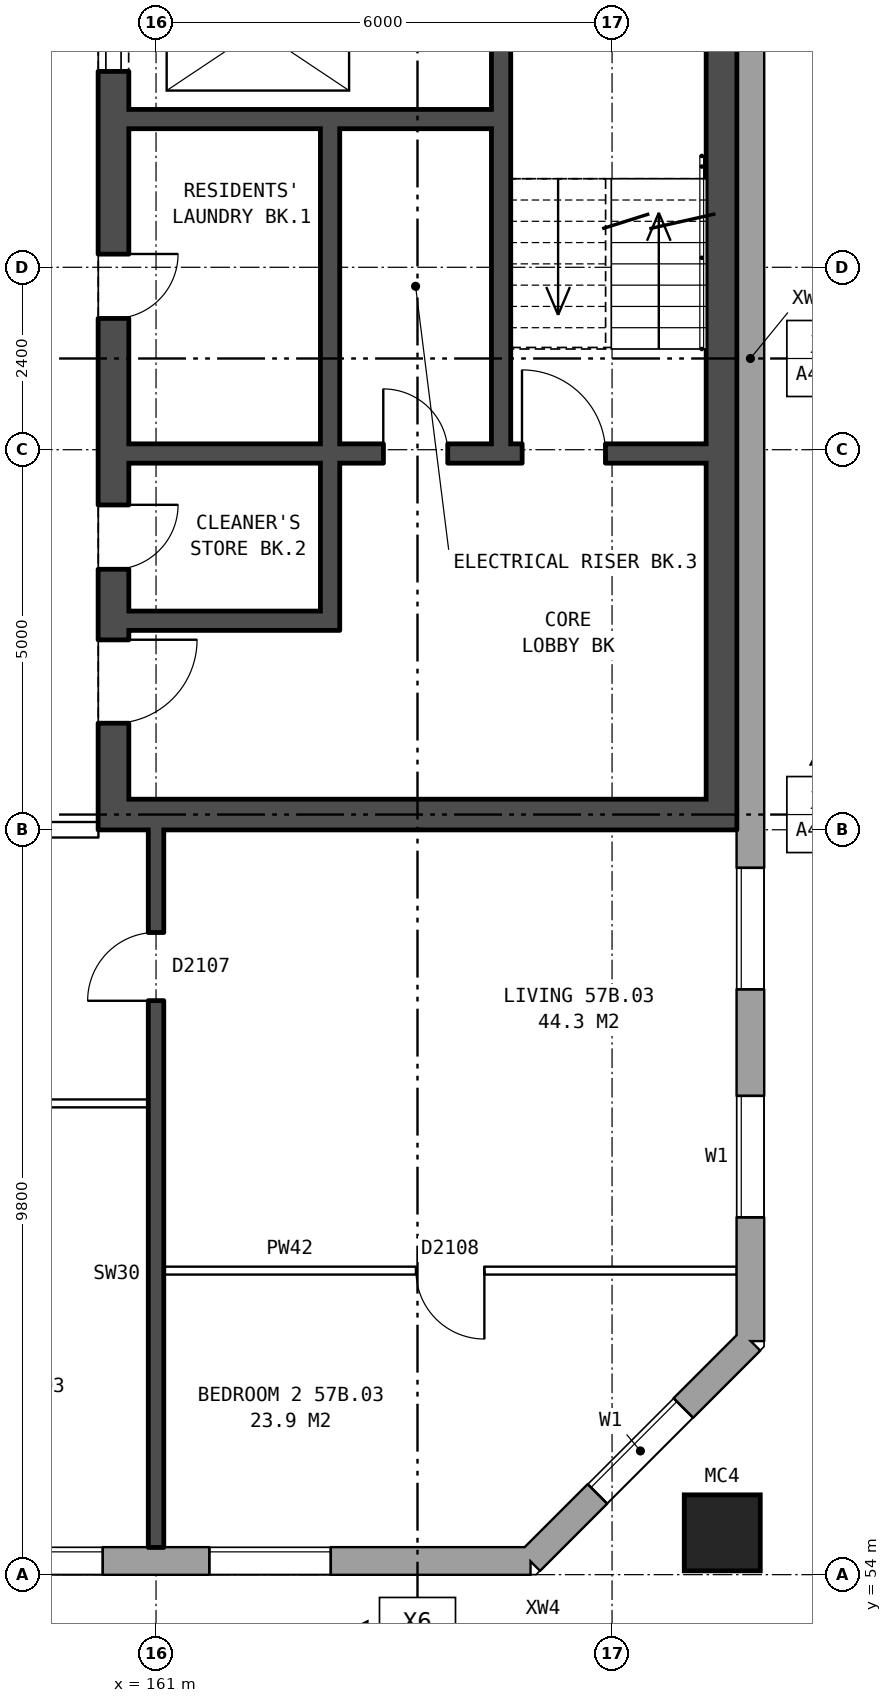
"""IFC4 building model, lengths in metres.
Left out: names, types, materials, properties, quantities, classifications, styles, units other than length and angle.
Written with IfcOpenShell. Run it as: python <this file> out.ifc"""

import sys

from ifc_helpers import new_model, si_unit, direction, frame, frame_2d, origin, origin_2d, place, context, subcontext, project, spatial, rectangle, hollow_rectangle, extrude, element, fill, save


model = new_model("IFC4")
c1 = context("Model", 3, precision=1e-05, world=origin(), true_north=direction((0.0, 1.0)))
c2 = subcontext(c1, "Body", "Model", "MODEL_VIEW")
j1 = project(units=[si_unit("LENGTHUNIT", "METRE"), si_unit("PLANEANGLEUNIT", "RADIAN")], contexts=[c1])
p1 = place(None, origin())
s1 = spatial("IfcSite", under=j1, at=p1, CompositionType="ELEMENT")
p2 = place(p1, origin())
s2 = spatial("IfcBuilding", under=s1, at=p2, CompositionType="ELEMENT")
p3 = place(p2, frame((0.0, 0.0, 202.8)))
s3 = spatial("IfcBuildingStorey", under=s2, at=p3, CompositionType="ELEMENT", Elevation=202.8)
p4 = place(p3, frame((168.45, 54.55, 0.0), z_axis=(0.0, 0.0, 1.0), x_axis=(1.0, 0.0, 0.0)))
e1 = element("IfcColumn", 1, at=p4, inside=s3, PredefinedType="COLUMN", context=c2, shape_type="SweptSolid", body=[
    extrude(hollow_rectangle(XDim=1.0, YDim=1.0, WallThickness=0.055, at=origin_2d()), origin(), (0.0, 0.0, 1.0), 3.1),
])
p5 = place(p3, frame((132.05, 54.18, 0.0), z_axis=(0.0, 0.0, 1.0), x_axis=(1.0, 0.0, 0.0)))
e2 = element("IfcWall", 2, at=p5, inside=s3, PredefinedType="STANDARD", context=c2, shape_type="SweptSolid", body=[
    extrude(rectangle(XDim=33.875, YDim=0.36, at=frame_2d((16.938, 0.0))), origin(), (0.0, 0.0, 1.0), 2.85),
])
p6 = place(p5, frame((2.65, 0.0, 0.8)))
e3 = element("IfcOpeningElement", 3, at=p6, cuts=e2, PredefinedType="OPENING", context=c2, shape_type="SweptSolid", body=[
    extrude(rectangle(XDim=1.6, YDim=1.8, at=frame_2d((0.8, 0.9))), frame((0.0, 0.19, 0.0), z_axis=(0.0, -1.0, 0.0), x_axis=(1.0, 0.0, 0.0)), (0.0, 0.0, 1.0), 0.38),
])
p7 = place(p5, frame((5.65, 0.0, 0.8)))
e4 = element("IfcOpeningElement", 4, at=p7, cuts=e2, PredefinedType="OPENING", context=c2, shape_type="SweptSolid", body=[
    extrude(rectangle(XDim=1.6, YDim=1.8, at=frame_2d((0.8, 0.9))), frame((0.0, 0.19, 0.0), z_axis=(0.0, -1.0, 0.0), x_axis=(1.0, 0.0, 0.0)), (0.0, 0.0, 1.0), 0.38),
])
p8 = place(p5, frame((8.65, 0.0, 0.8)))
e5 = element("IfcOpeningElement", 5, at=p8, cuts=e2, PredefinedType="OPENING", context=c2, shape_type="SweptSolid", body=[
    extrude(rectangle(XDim=1.6, YDim=1.8, at=frame_2d((0.8, 0.9))), frame((0.0, 0.19, 0.0), z_axis=(0.0, -1.0, 0.0), x_axis=(1.0, 0.0, 0.0)), (0.0, 0.0, 1.0), 0.38),
])
p9 = place(p5, frame((11.65, 0.0, 0.8)))
e6 = element("IfcOpeningElement", 6, at=p9, cuts=e2, PredefinedType="OPENING", context=c2, shape_type="SweptSolid", body=[
    extrude(rectangle(XDim=1.6, YDim=1.8, at=frame_2d((0.8, 0.9))), frame((0.0, 0.19, 0.0), z_axis=(0.0, -1.0, 0.0), x_axis=(1.0, 0.0, 0.0)), (0.0, 0.0, 1.0), 0.38),
])
p10 = place(p5, frame((14.65, 0.0, 0.8)))
e7 = element("IfcOpeningElement", 7, at=p10, cuts=e2, PredefinedType="OPENING", context=c2, shape_type="SweptSolid", body=[
    extrude(rectangle(XDim=1.6, YDim=1.8, at=frame_2d((0.8, 0.9))), frame((0.0, 0.19, 0.0), z_axis=(0.0, -1.0, 0.0), x_axis=(1.0, 0.0, 0.0)), (0.0, 0.0, 1.0), 0.38),
])
p11 = place(p5, frame((17.65, 0.0, 0.8)))
e8 = element("IfcOpeningElement", 8, at=p11, cuts=e2, PredefinedType="OPENING", context=c2, shape_type="SweptSolid", body=[
    extrude(rectangle(XDim=1.6, YDim=1.8, at=frame_2d((0.8, 0.9))), frame((0.0, 0.19, 0.0), z_axis=(0.0, -1.0, 0.0), x_axis=(1.0, 0.0, 0.0)), (0.0, 0.0, 1.0), 0.38),
])
p12 = place(p5, frame((20.65, 0.0, 0.8)))
e9 = element("IfcOpeningElement", 9, at=p12, cuts=e2, PredefinedType="OPENING", context=c2, shape_type="SweptSolid", body=[
    extrude(rectangle(XDim=1.6, YDim=1.8, at=frame_2d((0.8, 0.9))), frame((0.0, 0.19, 0.0), z_axis=(0.0, -1.0, 0.0), x_axis=(1.0, 0.0, 0.0)), (0.0, 0.0, 1.0), 0.38),
])
p13 = place(p5, frame((23.65, 0.0, 0.8)))
e10 = element("IfcOpeningElement", 10, at=p13, cuts=e2, PredefinedType="OPENING", context=c2, shape_type="SweptSolid", body=[
    extrude(rectangle(XDim=1.6, YDim=1.8, at=frame_2d((0.8, 0.9))), frame((0.0, 0.19, 0.0), z_axis=(0.0, -1.0, 0.0), x_axis=(1.0, 0.0, 0.0)), (0.0, 0.0, 1.0), 0.38),
])
p14 = place(p5, frame((26.65, 0.0, 0.8)))
e11 = element("IfcOpeningElement", 11, at=p14, cuts=e2, PredefinedType="OPENING", context=c2, shape_type="SweptSolid", body=[
    extrude(rectangle(XDim=1.6, YDim=1.8, at=frame_2d((0.8, 0.9))), frame((0.0, 0.19, 0.0), z_axis=(0.0, -1.0, 0.0), x_axis=(1.0, 0.0, 0.0)), (0.0, 0.0, 1.0), 0.38),
])
p15 = place(p5, frame((29.65, 0.0, 0.8)))
e12 = element("IfcOpeningElement", 12, at=p15, cuts=e2, PredefinedType="OPENING", context=c2, shape_type="SweptSolid", body=[
    extrude(rectangle(XDim=1.6, YDim=1.8, at=frame_2d((0.8, 0.9))), frame((0.0, 0.19, 0.0), z_axis=(0.0, -1.0, 0.0), x_axis=(1.0, 0.0, 0.0)), (0.0, 0.0, 1.0), 0.38),
])
p16 = place(p3, frame((165.925, 54.18, 0.0), z_axis=(0.0, 0.0, 1.0), x_axis=(0.707106781187, 0.707106781187, 0.0)))
e13 = element("IfcWall", 13, at=p16, inside=s3, PredefinedType="STANDARD", context=c2, shape_type="SweptSolid", body=[
    extrude(rectangle(XDim=4.094, YDim=0.36, at=frame_2d((2.047, 0.0))), origin(), (0.0, 0.0, 1.0), 2.85),
])
p17 = place(p16, frame((1.247, 0.0, 0.8)))
e14 = element("IfcOpeningElement", 14, at=p17, cuts=e13, PredefinedType="OPENING", context=c2, shape_type="SweptSolid", body=[
    extrude(rectangle(XDim=1.6, YDim=1.8, at=frame_2d((0.8, 0.9))), frame((0.0, 0.19, 0.0), z_axis=(0.0, -1.0, 0.0), x_axis=(1.0, 0.0, 0.0)), (0.0, 0.0, 1.0), 0.38),
])
p18 = place(p3, frame((168.82, 57.075, 0.0), z_axis=(0.0, 0.0, 1.0), x_axis=(0.0, 1.0, 0.0)))
e15 = element("IfcWall", 15, at=p18, inside=s3, PredefinedType="STANDARD", context=c2, shape_type="SweptSolid", body=[
    extrude(rectangle(XDim=25.851, YDim=0.36, at=frame_2d((12.925, 0.0))), origin(), (0.0, 0.0, 1.0), 2.85),
])
p19 = place(p18, frame((1.625, 0.0, 0.8)))
e16 = element("IfcOpeningElement", 16, at=p19, cuts=e15, PredefinedType="OPENING", context=c2, shape_type="SweptSolid", body=[
    extrude(rectangle(XDim=1.6, YDim=1.8, at=frame_2d((0.8, 0.9))), frame((0.0, 0.19, 0.0), z_axis=(0.0, -1.0, 0.0), x_axis=(1.0, 0.0, 0.0)), (0.0, 0.0, 1.0), 0.38),
])
p20 = place(p18, frame((4.625, 0.0, 0.8)))
e17 = element("IfcOpeningElement", 17, at=p20, cuts=e15, PredefinedType="OPENING", context=c2, shape_type="SweptSolid", body=[
    extrude(rectangle(XDim=1.6, YDim=1.8, at=frame_2d((0.8, 0.9))), frame((0.0, 0.19, 0.0), z_axis=(0.0, -1.0, 0.0), x_axis=(1.0, 0.0, 0.0)), (0.0, 0.0, 1.0), 0.38),
])
p21 = place(p18, frame((19.625, 0.0, 0.8)))
e18 = element("IfcOpeningElement", 18, at=p21, cuts=e15, PredefinedType="OPENING", context=c2, shape_type="SweptSolid", body=[
    extrude(rectangle(XDim=1.6, YDim=1.8, at=frame_2d((0.8, 0.9))), frame((0.0, 0.19, 0.0), z_axis=(0.0, -1.0, 0.0), x_axis=(1.0, 0.0, 0.0)), (0.0, 0.0, 1.0), 0.38),
])
p22 = place(p18, frame((22.625, 0.0, 0.8)))
e19 = element("IfcOpeningElement", 19, at=p22, cuts=e15, PredefinedType="OPENING", context=c2, shape_type="SweptSolid", body=[
    extrude(rectangle(XDim=1.6, YDim=1.8, at=frame_2d((0.8, 0.9))), frame((0.0, 0.19, 0.0), z_axis=(0.0, -1.0, 0.0), x_axis=(1.0, 0.0, 0.0)), (0.0, 0.0, 1.0), 0.38),
])
p23 = place(p3, frame((160.44, 76.2, 0.0), z_axis=(0.0, 0.0, 1.0), x_axis=(0.0, -1.0, 0.0)))
e20 = element("IfcWall", 20, at=p23, inside=s3, PredefinedType="SHEAR", context=c2, shape_type="SweptSolid", body=[
    extrude(rectangle(XDim=12.4, YDim=0.4, at=frame_2d((6.2, 0.0))), origin(), (0.0, 0.0, 1.0), 2.85),
])
p24 = place(p23, frame((1.325, 0.0, 0.0)))
e21 = element("IfcOpeningElement", 21, at=p24, cuts=e20, PredefinedType="OPENING", context=c2, shape_type="SweptSolid", body=[
    extrude(rectangle(XDim=1.1, YDim=2.1, at=frame_2d((0.55, 1.05))), frame((0.0, 0.21, 0.0), z_axis=(0.0, -1.0, 0.0), x_axis=(1.0, 0.0, 0.0)), (0.0, 0.0, 1.0), 0.42),
])
p25 = place(p23, frame((4.825, 0.0, 0.0)))
e22 = element("IfcOpeningElement", 22, at=p25, cuts=e20, PredefinedType="OPENING", context=c2, shape_type="SweptSolid", body=[
    extrude(rectangle(XDim=0.85, YDim=2.1, at=frame_2d((0.425, 1.05))), frame((0.0, 0.21, 0.0), z_axis=(0.0, -1.0, 0.0), x_axis=(1.0, 0.0, 0.0)), (0.0, 0.0, 1.0), 0.42),
])
p26 = place(p23, frame((9.9, 0.0, 0.0)))
e23 = element("IfcOpeningElement", 23, at=p26, cuts=e20, PredefinedType="OPENING", context=c2, shape_type="SweptSolid", body=[
    extrude(rectangle(XDim=1.1, YDim=2.1, at=frame_2d((0.55, 1.05))), frame((0.0, 0.21, 0.0), z_axis=(0.0, -1.0, 0.0), x_axis=(1.0, 0.0, 0.0)), (0.0, 0.0, 1.0), 0.42),
])
p27 = place(p23, frame((8.125, 0.0, 0.0)))
e24 = element("IfcOpeningElement", 24, at=p27, cuts=e20, PredefinedType="OPENING", context=c2, shape_type="SweptSolid", body=[
    extrude(rectangle(XDim=0.85, YDim=2.1, at=frame_2d((0.425, 1.05))), frame((0.0, 0.21, 0.0), z_axis=(0.0, -1.0, 0.0), x_axis=(1.0, 0.0, 0.0)), (0.0, 0.0, 1.0), 0.42),
])
p28 = place(p3, frame((168.44, 76.2, 0.0), z_axis=(0.0, 0.0, 1.0), x_axis=(0.0, -1.0, 0.0)))
e25 = element("IfcWall", 25, at=p28, inside=s3, PredefinedType="SHEAR", context=c2, shape_type="SweptSolid", body=[
    extrude(rectangle(XDim=12.4, YDim=0.4, at=frame_2d((6.2, 0.0))), origin(), (0.0, 0.0, 1.0), 2.85),
])
p29 = place(p3, frame((160.64, 64.0, 0.0), z_axis=(0.0, 0.0, 1.0), x_axis=(1.0, 0.0, 0.0)))
e26 = element("IfcWall", 26, at=p29, inside=s3, PredefinedType="SHEAR", context=c2, shape_type="SweptSolid", body=[
    extrude(rectangle(XDim=7.6, YDim=0.4, at=frame_2d((3.8, 0.0))), origin(), (0.0, 0.0, 1.0), 2.85),
])
p30 = place(p3, frame((160.64, 73.15, 0.0), z_axis=(0.0, 0.0, 1.0), x_axis=(1.0, 0.0, 0.0)))
e27 = element("IfcWall", 27, at=p30, inside=s3, PredefinedType="SHEAR", context=c2, shape_type="SweptSolid", body=[
    extrude(rectangle(XDim=4.775, YDim=0.25, at=frame_2d((2.388, 0.0))), origin(), (0.0, 0.0, 1.0), 2.85),
])
p31 = place(p3, frame((160.64, 68.75, 0.0), z_axis=(0.0, 0.0, 1.0), x_axis=(1.0, 0.0, 0.0)))
e28 = element("IfcWall", 28, at=p31, inside=s3, PredefinedType="SHEAR", context=c2, shape_type="SweptSolid", body=[
    extrude(rectangle(XDim=7.6, YDim=0.25, at=frame_2d((3.8, 0.0))), origin(), (0.0, 0.0, 1.0), 2.85),
])
p32 = place(p31, frame((5.175, 0.0, 0.0)))
e29 = element("IfcOpeningElement", 29, at=p32, cuts=e28, PredefinedType="OPENING", context=c2, shape_type="SweptSolid", body=[
    extrude(rectangle(XDim=1.1, YDim=2.1, at=frame_2d((0.55, 1.05))), frame((0.0, 0.135, 0.0), z_axis=(0.0, -1.0, 0.0), x_axis=(1.0, 0.0, 0.0)), (0.0, 0.0, 1.0), 0.27),
])
p33 = place(p31, frame((3.35, 0.0, 0.0)))
e30 = element("IfcOpeningElement", 30, at=p33, cuts=e28, PredefinedType="OPENING", context=c2, shape_type="SweptSolid", body=[
    extrude(rectangle(XDim=0.85, YDim=2.1, at=frame_2d((0.425, 1.05))), frame((0.0, 0.135, 0.0), z_axis=(0.0, -1.0, 0.0), x_axis=(1.0, 0.0, 0.0)), (0.0, 0.0, 1.0), 0.27),
])
p34 = place(p3, frame((160.64, 66.55, 0.0), z_axis=(0.0, 0.0, 1.0), x_axis=(1.0, 0.0, 0.0)))
e31 = element("IfcWall", 31, at=p34, inside=s3, PredefinedType="SHEAR", context=c2, shape_type="SweptSolid", body=[
    extrude(rectangle(XDim=2.525, YDim=0.25, at=frame_2d((1.263, 0.0))), origin(), (0.0, 0.0, 1.0), 2.85),
])
p35 = place(p3, frame((163.29, 73.025, 0.0), z_axis=(0.0, 0.0, 1.0), x_axis=(0.0, -1.0, 0.0)))
e32 = element("IfcWall", 32, at=p35, inside=s3, PredefinedType="SHEAR", context=c2, shape_type="SweptSolid", body=[
    extrude(rectangle(XDim=4.15, YDim=0.25, at=frame_2d((2.075, 0.0))), origin(), (0.0, 0.0, 1.0), 2.85),
])
p36 = place(p3, frame((163.29, 68.625, 0.0), z_axis=(0.0, 0.0, 1.0), x_axis=(0.0, -1.0, 0.0)))
e33 = element("IfcWall", 33, at=p36, inside=s3, PredefinedType="SHEAR", context=c2, shape_type="SweptSolid", body=[
    extrude(rectangle(XDim=2.2, YDim=0.25, at=frame_2d((1.1, 0.0))), origin(), (0.0, 0.0, 1.0), 2.85),
])
p37 = place(p3, frame((165.54, 75.8, 0.0), z_axis=(0.0, 0.0, 1.0), x_axis=(0.0, -1.0, 0.0)))
e34 = element("IfcWall", 34, at=p37, inside=s3, PredefinedType="SHEAR", context=c2, shape_type="SweptSolid", body=[
    extrude(rectangle(XDim=6.925, YDim=0.25, at=frame_2d((3.462, 0.0))), origin(), (0.0, 0.0, 1.0), 2.85),
])
p38 = place(p3, frame((161.1, 58.0, 0.0), z_axis=(0.0, 0.0, 1.0), x_axis=(1.0, 0.0, 0.0)))
e35 = element("IfcWall", 35, at=p38, inside=s3, PredefinedType="PARTITIONING", context=c2, shape_type="SweptSolid", body=[
    extrude(rectangle(XDim=7.54, YDim=0.1, at=frame_2d((3.77, 0.0))), origin(), (0.0, 0.0, 1.0), 2.85),
])
p39 = place(p38, frame((3.32, 0.0, 0.0)))
e36 = element("IfcOpeningElement", 36, at=p39, cuts=e35, PredefinedType="OPENING", context=c2, shape_type="SweptSolid", body=[
    extrude(rectangle(XDim=0.9, YDim=2.1, at=frame_2d((0.45, 1.05))), frame((0.0, 0.06, 0.0), z_axis=(0.0, -1.0, 0.0), x_axis=(1.0, 0.0, 0.0)), (0.0, 0.0, 1.0), 0.12),
])
p40 = place(p3, frame((155.1, 60.2, 0.0), z_axis=(0.0, 0.0, 1.0), x_axis=(1.0, 0.0, 0.0)))
e37 = element("IfcWall", 37, at=p40, inside=s3, PredefinedType="PARTITIONING", context=c2, shape_type="SweptSolid", body=[
    extrude(rectangle(XDim=5.8, YDim=0.1, at=frame_2d((2.9, 0.0))), origin(), (0.0, 0.0, 1.0), 2.85),
])
p41 = place(p40, frame((3.6, 0.0, 0.0)))
e38 = element("IfcOpeningElement", 38, at=p41, cuts=e37, PredefinedType="OPENING", context=c2, shape_type="SweptSolid", body=[
    extrude(rectangle(XDim=0.9, YDim=2.1, at=frame_2d((0.45, 1.05))), frame((0.0, 0.06, 0.0), z_axis=(0.0, -1.0, 0.0), x_axis=(1.0, 0.0, 0.0)), (0.0, 0.0, 1.0), 0.12),
])
p42 = place(p40, frame((0.7, 0.0, 0.0)))
e39 = element("IfcOpeningElement", 39, at=p42, cuts=e37, PredefinedType="OPENING", context=c2, shape_type="SweptSolid", body=[
    extrude(rectangle(XDim=0.9, YDim=2.1, at=frame_2d((0.45, 1.05))), frame((0.0, 0.06, 0.0), z_axis=(0.0, -1.0, 0.0), x_axis=(1.0, 0.0, 0.0)), (0.0, 0.0, 1.0), 0.12),
])
p43 = place(p3, frame((157.24, 63.8, 0.0), z_axis=(0.0, 0.0, 1.0), x_axis=(1.0, 0.0, 0.0)))
e40 = element("IfcWall", 40, at=p43, inside=s3, PredefinedType="PARTITIONING", context=c2, shape_type="SweptSolid", body=[
    extrude(rectangle(XDim=3.0, YDim=0.2, at=frame_2d((1.5, 0.0))), origin(), (0.0, 0.0, 1.0), 2.85),
])
p44 = place(p43, frame((1.0, 0.0, 0.0)))
e41 = element("IfcOpeningElement", 41, at=p44, cuts=e40, PredefinedType="OPENING", context=c2, shape_type="SweptSolid", body=[
    extrude(rectangle(XDim=1.0, YDim=2.1, at=frame_2d((0.5, 1.05))), frame((0.0, 0.11, 0.0), z_axis=(0.0, -1.0, 0.0), x_axis=(1.0, 0.0, 0.0)), (0.0, 0.0, 1.0), 0.22),
])
p45 = place(p3, frame((161.0, 54.36, 0.0), z_axis=(0.0, 0.0, 1.0), x_axis=(0.0, 1.0, 0.0)))
e42 = element("IfcWall", 42, at=p45, inside=s3, PredefinedType="SOLIDWALL", context=c2, shape_type="SweptSolid", body=[
    extrude(rectangle(XDim=9.44, YDim=0.2, at=frame_2d((4.72, 0.0))), origin(), (0.0, 0.0, 1.0), 2.85),
])
p46 = place(p45, frame((7.19, 0.0, 0.0)))
e43 = element("IfcOpeningElement", 43, at=p46, cuts=e42, PredefinedType="OPENING", context=c2, shape_type="SweptSolid", body=[
    extrude(rectangle(XDim=0.9, YDim=2.1, at=frame_2d((0.45, 1.05))), frame((0.0, 0.11, 0.0), z_axis=(0.0, -1.0, 0.0), x_axis=(1.0, 0.0, 0.0)), (0.0, 0.0, 1.0), 0.22),
])
p47 = place(p14, origin())
e44 = element("IfcWindow", 44, at=p47, inside=s3, PartitioningType="SINGLE_PANEL", PredefinedType="WINDOW", context=c2, shape_type="SweptSolid", body=[
    extrude(rectangle(XDim=1.6, YDim=1.8, at=frame_2d((0.8, 0.9))), frame((0.0, 0.15, 0.0), z_axis=(0.0, -1.0, 0.0), x_axis=(1.0, 0.0, 0.0)), (0.0, 0.0, 1.0), 0.06),
])
fill(e11, e44)
p48 = place(p15, origin())
e45 = element("IfcWindow", 45, at=p48, inside=s3, PartitioningType="SINGLE_PANEL", PredefinedType="WINDOW", context=c2, shape_type="SweptSolid", body=[
    extrude(rectangle(XDim=1.6, YDim=1.8, at=frame_2d((0.8, 0.9))), frame((0.0, 0.15, 0.0), z_axis=(0.0, -1.0, 0.0), x_axis=(1.0, 0.0, 0.0)), (0.0, 0.0, 1.0), 0.06),
])
fill(e12, e45)
p49 = place(p17, origin())
e46 = element("IfcWindow", 46, at=p49, inside=s3, PartitioningType="SINGLE_PANEL", PredefinedType="WINDOW", context=c2, shape_type="SweptSolid", body=[
    extrude(rectangle(XDim=1.6, YDim=1.8, at=frame_2d((0.8, 0.9))), frame((0.0, 0.15, 0.0), z_axis=(0.0, -1.0, 0.0), x_axis=(1.0, 0.0, 0.0)), (0.0, 0.0, 1.0), 0.06),
])
fill(e14, e46)
p50 = place(p19, origin())
e47 = element("IfcWindow", 47, at=p50, inside=s3, PartitioningType="SINGLE_PANEL", PredefinedType="WINDOW", context=c2, shape_type="SweptSolid", body=[
    extrude(rectangle(XDim=1.6, YDim=1.8, at=frame_2d((0.8, 0.9))), frame((0.0, 0.15, 0.0), z_axis=(0.0, -1.0, 0.0), x_axis=(1.0, 0.0, 0.0)), (0.0, 0.0, 1.0), 0.06),
])
fill(e16, e47)
p51 = place(p20, origin())
e48 = element("IfcWindow", 48, at=p51, inside=s3, PartitioningType="SINGLE_PANEL", PredefinedType="WINDOW", context=c2, shape_type="SweptSolid", body=[
    extrude(rectangle(XDim=1.6, YDim=1.8, at=frame_2d((0.8, 0.9))), frame((0.0, 0.15, 0.0), z_axis=(0.0, -1.0, 0.0), x_axis=(1.0, 0.0, 0.0)), (0.0, 0.0, 1.0), 0.06),
])
fill(e17, e48)
p52 = place(p24, origin())
e49 = element("IfcDoor", 49, at=p52, inside=s3, OperationType="DOUBLE_DOOR_SLIDING", PredefinedType="DOOR", context=c2, shape_type="SweptSolid", body=[
    extrude(rectangle(XDim=1.1, YDim=2.1, at=frame_2d((0.55, 1.05))), frame((0.0, 0.185, 0.0), z_axis=(0.0, -1.0, 0.0), x_axis=(1.0, 0.0, 0.0)), (0.0, 0.0, 1.0), 0.05),
])
fill(e21, e49)
p53 = place(p25, origin())
e50 = element("IfcDoor", 50, at=p53, inside=s3, OperationType="SINGLE_SWING_LEFT", PredefinedType="DOOR", context=c2, shape_type="SweptSolid", body=[
    extrude(rectangle(XDim=0.85, YDim=2.1, at=frame_2d((0.425, 1.05))), frame((0.0, 0.185, 0.0), z_axis=(0.0, -1.0, 0.0), x_axis=(1.0, 0.0, 0.0)), (0.0, 0.0, 1.0), 0.05),
])
fill(e22, e50)
p54 = place(p26, origin())
e51 = element("IfcDoor", 51, at=p54, inside=s3, OperationType="SINGLE_SWING_LEFT", PredefinedType="DOOR", context=c2, shape_type="SweptSolid", body=[
    extrude(rectangle(XDim=1.1, YDim=2.1, at=frame_2d((0.55, 1.05))), frame((0.0, 0.185, 0.0), z_axis=(0.0, -1.0, 0.0), x_axis=(1.0, 0.0, 0.0)), (0.0, 0.0, 1.0), 0.05),
])
fill(e23, e51)
p55 = place(p32, origin())
e52 = element("IfcDoor", 52, at=p55, inside=s3, OperationType="SINGLE_SWING_LEFT", PredefinedType="DOOR", context=c2, shape_type="SweptSolid", body=[
    extrude(rectangle(XDim=1.1, YDim=2.1, at=frame_2d((0.55, 1.05))), frame((0.0, 0.025, 0.0), z_axis=(0.0, -1.0, 0.0), x_axis=(1.0, 0.0, 0.0)), (0.0, 0.0, 1.0), 0.05),
])
fill(e29, e52)
p56 = place(p27, origin())
e53 = element("IfcDoor", 53, at=p56, inside=s3, OperationType="SINGLE_SWING_LEFT", PredefinedType="DOOR", context=c2, shape_type="SweptSolid", body=[
    extrude(rectangle(XDim=0.85, YDim=2.1, at=frame_2d((0.425, 1.05))), frame((0.0, 0.185, 0.0), z_axis=(0.0, -1.0, 0.0), x_axis=(1.0, 0.0, 0.0)), (0.0, 0.0, 1.0), 0.05),
])
fill(e24, e53)
p57 = place(p33, origin())
e54 = element("IfcDoor", 54, at=p57, inside=s3, OperationType="SINGLE_SWING_LEFT", PredefinedType="DOOR", context=c2, shape_type="SweptSolid", body=[
    extrude(rectangle(XDim=0.85, YDim=2.1, at=frame_2d((0.425, 1.05))), frame((0.0, 0.025, 0.0), z_axis=(0.0, -1.0, 0.0), x_axis=(1.0, 0.0, 0.0)), (0.0, 0.0, 1.0), 0.05),
])
fill(e30, e54)
p58 = place(p39, frame((0.9, 0.0, 0.0), z_axis=(0.0, 0.0, 1.0), x_axis=(-1.0, 0.0, 0.0)))
e55 = element("IfcDoor", 55, at=p58, inside=s3, OperationType="SINGLE_SWING_LEFT", PredefinedType="DOOR", context=c2, shape_type="SweptSolid", body=[
    extrude(rectangle(XDim=0.9, YDim=2.1, at=frame_2d((0.45, 1.05))), frame((0.0, 0.025, 0.0), z_axis=(0.0, -1.0, 0.0), x_axis=(1.0, 0.0, 0.0)), (0.0, 0.0, 1.0), 0.05),
])
fill(e36, e55)
p59 = place(p46, origin())
e56 = element("IfcDoor", 56, at=p59, inside=s3, OperationType="SINGLE_SWING_LEFT", PredefinedType="DOOR", context=c2, shape_type="SweptSolid", body=[
    extrude(rectangle(XDim=0.9, YDim=2.1, at=frame_2d((0.45, 1.05))), frame((0.0, 0.025, 0.0), z_axis=(0.0, -1.0, 0.0), x_axis=(1.0, 0.0, 0.0)), (0.0, 0.0, 1.0), 0.05),
])
fill(e43, e56)
save(model, sys.argv[1])
